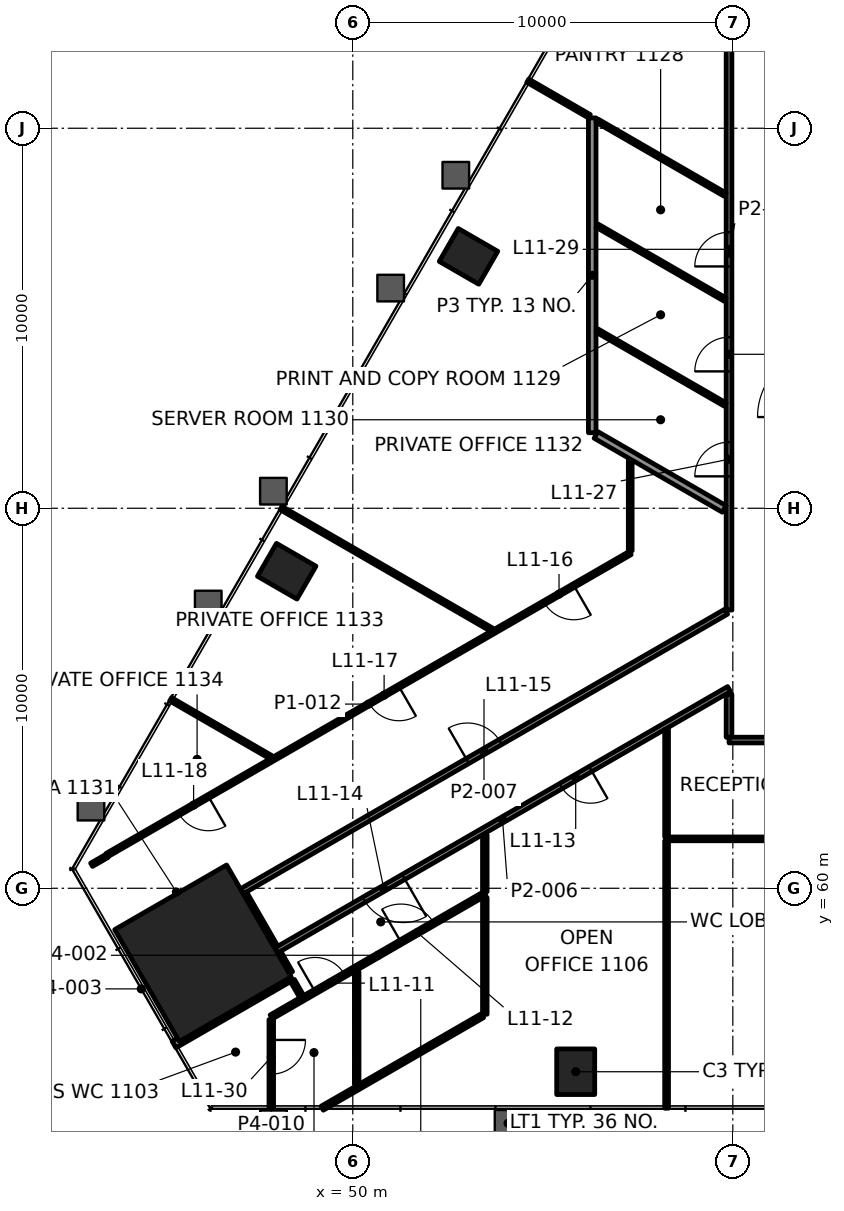
"""IFC4 building model, lengths in metres.
Left out: names, types, materials, properties, quantities, classifications, styles, units other than length and angle.
Written with IfcOpenShell. Run it as: python <this file> out.ifc"""

import sys

from ifc_helpers import new_model, si_unit, direction, frame, frame_2d, origin, origin_2d, place, context, subcontext, project, spatial, rectangle, extrude, element, fill, save


model = new_model("IFC4")
c1 = context("Model", 3, precision=1e-05, world=origin(), true_north=direction((0.0, 1.0)))
c2 = subcontext(c1, "Body", "Model", "MODEL_VIEW")
j1 = project(units=[si_unit("LENGTHUNIT", "METRE"), si_unit("PLANEANGLEUNIT", "RADIAN")], contexts=[c1])
p1 = place(None, origin())
s1 = spatial("IfcSite", under=j1, at=p1, CompositionType="ELEMENT")
p2 = place(p1, origin())
s2 = spatial("IfcBuilding", under=s1, at=p2, CompositionType="ELEMENT")
p3 = place(p2, frame((0.0, 0.0, 52.6)))
s3 = spatial("IfcBuildingStorey", under=s2, at=p3, CompositionType="ELEMENT", Elevation=52.6)
p4 = place(p3, frame((46.057, 58.29, 0.0), z_axis=(0.0, 0.0, 1.0), x_axis=(0.5, -0.866025403784, 0.0)))
e1 = element("IfcColumn", 1, at=p4, inside=s3, PredefinedType="COLUMN", context=c2, shape_type="SweptSolid", body=[
    extrude(rectangle(XDim=3.4, YDim=3.4, at=origin_2d()), origin(), (0.0, 0.0, 1.0), 4.2),
])
for number, where, z_axis, x_axis in (
    (2, (55.865, 55.172, -0.0), (0.0, 0.0, 1.0), (1.0, 0.0, 0.0)),
    (3, (53.045, 76.628, -0.0), (0.0, 0.0, 1.0), (-0.5, -0.866, 0.0)),
    (4, (48.261, 68.343, -0.0), (0.0, 0.0, 1.0), (-0.5, -0.866, 0.0)),
):
    element("IfcColumn", number, at=place(p3, frame(where, z_axis=z_axis, x_axis=x_axis)), inside=s3, PredefinedType="COLUMN", context=c2, shape_type="SweptSolid", body=[
        extrude(rectangle(XDim=1.0, YDim=1.2, at=origin_2d()), origin(), (0.0, 0.0, 1.0), 4.2),
    ])
p5 = place(p3, frame((58.271, 61.3, 0.0), z_axis=(0.0, 0.0, 1.0), x_axis=(1.0, 0.0, 0.0)))
e5 = element("IfcWall", 5, at=p5, inside=s3, PredefinedType="PARTITIONING", context=c2, shape_type="SweptSolid", body=[
    extrude(rectangle(XDim=16.729, YDim=0.1, at=frame_2d((8.365, 0.0))), origin(), (0.0, 0.0, 1.0), 3.4),
])
p6 = place(p5, frame((7.865, 0.0, 0.0)))
e6 = element("IfcOpeningElement", 6, at=p6, cuts=e5, PredefinedType="OPENING", context=c2, shape_type="SweptSolid", body=[
    extrude(rectangle(XDim=1.0, YDim=2.1, at=frame_2d((0.5, 1.05))), frame((0.0, 0.06, 0.0), z_axis=(0.0, -1.0, 0.0), x_axis=(1.0, 0.0, 0.0)), (0.0, 0.0, 1.0), 0.12),
])
p7 = place(p3, frame((90.1, 63.9, 0.0), z_axis=(0.0, 0.0, 1.0), x_axis=(-1.0, 0.0, 0.0)))
e7 = element("IfcWall", 7, at=p7, inside=s3, PredefinedType="PARTITIONING", context=c2, shape_type="SweptSolid", body=[
    extrude(rectangle(XDim=30.2, YDim=0.15, at=frame_2d((15.1, 0.0))), origin(), (0.0, 0.0, 1.0), 3.4),
])
p8 = place(p7, frame((3.578, 0.0, 0.0)))
e8 = element("IfcOpeningElement", 8, at=p8, cuts=e7, PredefinedType="OPENING", context=c2, shape_type="SweptSolid", body=[
    extrude(rectangle(XDim=1.0, YDim=2.1, at=frame_2d((0.5, 1.05))), frame((0.0, 0.085, 0.0), z_axis=(0.0, -1.0, 0.0), x_axis=(1.0, 0.0, 0.0)), (0.0, 0.0, 1.0), 0.17),
])
p9 = place(p7, frame((10.926, 0.0, 0.0)))
e9 = element("IfcOpeningElement", 9, at=p9, cuts=e7, PredefinedType="OPENING", context=c2, shape_type="SweptSolid", body=[
    extrude(rectangle(XDim=1.0, YDim=2.1, at=frame_2d((0.5, 1.05))), frame((0.0, 0.085, 0.0), z_axis=(0.0, -1.0, 0.0), x_axis=(1.0, 0.0, 0.0)), (0.0, 0.0, 1.0), 0.17),
])
p10 = place(p7, frame((22.048, 0.0, 0.0)))
e10 = element("IfcOpeningElement", 10, at=p10, cuts=e7, PredefinedType="OPENING", context=c2, shape_type="SweptSolid", body=[
    extrude(rectangle(XDim=1.0, YDim=2.1, at=frame_2d((0.5, 1.05))), frame((0.0, 0.085, 0.0), z_axis=(0.0, -1.0, 0.0), x_axis=(1.0, 0.0, 0.0)), (0.0, 0.0, 1.0), 0.17),
])
p11 = place(p3, frame((49.194, 54.212, 0.0), z_axis=(0.0, 0.0, 1.0), x_axis=(0.866016997745, 0.500014559404, 0.0)))
e11 = element("IfcWall", 11, at=p11, inside=s3, PredefinedType="PARTITIONING", context=c2, shape_type="SweptSolid", body=[
    extrude(rectangle(XDim=4.871, YDim=0.12, at=frame_2d((2.436, 0.0))), origin(), (0.0, 0.0, 1.0), 3.4),
])
p12 = place(p3, frame((47.855, 56.615, 0.0), z_axis=(0.0, 0.0, 1.0), x_axis=(0.866008853477, 0.500028664877, 0.0)))
e12 = element("IfcWall", 12, at=p12, inside=s3, PredefinedType="PARTITIONING", context=c2, shape_type="SweptSolid", body=[
    extrude(rectangle(XDim=6.487, YDim=0.12, at=frame_2d((3.244, 0.0))), origin(), (0.0, 0.0, 1.0), 3.4),
])
p13 = place(p12, frame((1.329, 0.0, 0.0)))
e13 = element("IfcOpeningElement", 13, at=p13, cuts=e12, PredefinedType="OPENING", context=c2, shape_type="SweptSolid", body=[
    extrude(rectangle(XDim=0.9, YDim=2.1, at=frame_2d((0.45, 1.05))), frame((0.0, 0.07, 0.0), z_axis=(0.0, -1.0, 0.0), x_axis=(1.0, 0.0, 0.0)), (0.0, 0.0, 1.0), 0.14),
])
p14 = place(p12, frame((3.939, 0.0, 0.0)))
e14 = element("IfcOpeningElement", 14, at=p14, cuts=e12, PredefinedType="OPENING", context=c2, shape_type="SweptSolid", body=[
    extrude(rectangle(XDim=1.0, YDim=2.1, at=frame_2d((0.5, 1.05))), frame((0.0, 0.07, 0.0), z_axis=(0.0, -1.0, 0.0), x_axis=(1.0, 0.0, 0.0)), (0.0, 0.0, 1.0), 0.14),
])
p15 = place(p3, frame((45.296, 55.888, 0.0), z_axis=(0.0, 0.0, 1.0), x_axis=(0.866016916595, 0.500014699955, 0.0)))
e15 = element("IfcWall", 15, at=p15, inside=s3, PredefinedType="PARTITIONING", context=c2, shape_type="SweptSolid", body=[
    extrude(rectangle(XDim=3.543, YDim=0.2, at=frame_2d((1.772, 0.0))), origin(), (0.0, 0.0, 1.0), 3.4),
])
p16 = place(p3, frame((59.9, 65.243, 0.0), z_axis=(0.0, 0.0, 1.0), x_axis=(-0.866026378386, -0.499998311937, 0.0)))
e16 = element("IfcWall", 16, at=p16, inside=s3, PredefinedType="PARTITIONING", context=c2, shape_type="SweptSolid", body=[
    extrude(rectangle(XDim=13.764, YDim=0.15, at=frame_2d((6.882, 0.0))), origin(), (0.0, 0.0, 1.0), 3.247),
])
p17 = place(p16, frame((4.209, 0.0, 0.0)))
e17 = element("IfcOpeningElement", 17, at=p17, cuts=e16, PredefinedType="OPENING", context=c2, shape_type="SweptSolid", body=[
    extrude(rectangle(XDim=0.9, YDim=2.1, at=frame_2d((0.45, 1.05))), frame((0.0, 0.085, 0.0), z_axis=(0.0, -1.0, 0.0), x_axis=(1.0, 0.0, 0.0)), (0.0, 0.0, 1.0), 0.17),
])
p18 = place(p16, frame((9.891, 0.0, 0.0)))
e18 = element("IfcOpeningElement", 18, at=p18, cuts=e16, PredefinedType="OPENING", context=c2, shape_type="SweptSolid", body=[
    extrude(rectangle(XDim=1.2, YDim=2.1, at=frame_2d((0.6, 1.05))), frame((0.0, 0.085, 0.0), z_axis=(0.0, -1.0, 0.0), x_axis=(1.0, 0.0, 0.0)), (0.0, 0.0, 1.0), 0.17),
])
p19 = place(p3, frame((47.08, 59.92, 0.0), z_axis=(0.0, 0.0, 1.0), x_axis=(0.866025356753, 0.50000008146, 0.0)))
e19 = element("IfcWall", 19, at=p19, inside=s3, PredefinedType="PARTITIONING", context=c2, shape_type="SweptSolid", body=[
    extrude(rectangle(XDim=14.717, YDim=0.15, at=frame_2d((7.358, 0.0))), origin(), (0.0, 0.0, 1.0), 3.4),
])
p20 = place(p19, frame((6.858, 0.0, 0.0)))
e20 = element("IfcOpeningElement", 20, at=p20, cuts=e19, PredefinedType="OPENING", context=c2, shape_type="SweptSolid", body=[
    extrude(rectangle(XDim=1.0, YDim=2.1, at=frame_2d((0.5, 1.05))), frame((0.0, 0.085, 0.0), z_axis=(0.0, -1.0, 0.0), x_axis=(1.0, 0.0, 0.0)), (0.0, 0.0, 1.0), 0.17),
])
p21 = place(p3, frame((43.127, 60.618, 0.0), z_axis=(0.0, 0.0, 1.0), x_axis=(0.865979310119, 0.500079828073, 0.0)))
e21 = element("IfcWall", 21, at=p21, inside=s3, PredefinedType="PARTITIONING", context=c2, shape_type="SweptSolid", body=[
    extrude(rectangle(XDim=0.473, YDim=0.1, at=frame_2d((0.237, 0.0))), origin(), (0.0, 0.0, 1.0), 3.4),
])
p22 = place(p3, frame((57.3, 68.823, 0.0), z_axis=(0.0, 0.0, 1.0), x_axis=(-0.8660275888, -0.499996215423, 0.0)))
e22 = element("IfcWall", 22, at=p22, inside=s3, PredefinedType="PARTITIONING", context=c2, shape_type="SweptSolid", body=[
    extrude(rectangle(XDim=15.902, YDim=0.1, at=frame_2d((7.951, 0.0))), origin(), (0.0, 0.0, 1.0), 3.4),
])
p23 = place(p22, frame((1.713, 0.0, 0.0)))
e23 = element("IfcOpeningElement", 23, at=p23, cuts=e22, PredefinedType="OPENING", context=c2, shape_type="SweptSolid", body=[
    extrude(rectangle(XDim=0.9, YDim=2.1, at=frame_2d((0.45, 1.05))), frame((0.0, 0.06, 0.0), z_axis=(0.0, -1.0, 0.0), x_axis=(1.0, 0.0, 0.0)), (0.0, 0.0, 1.0), 0.12),
])
p24 = place(p22, frame((7.027, 0.0, 0.0)))
e24 = element("IfcOpeningElement", 24, at=p24, cuts=e22, PredefinedType="OPENING", context=c2, shape_type="SweptSolid", body=[
    extrude(rectangle(XDim=0.9, YDim=2.1, at=frame_2d((0.45, 1.05))), frame((0.0, 0.06, 0.0), z_axis=(0.0, -1.0, 0.0), x_axis=(1.0, 0.0, 0.0)), (0.0, 0.0, 1.0), 0.12),
])
p25 = place(p22, frame((12.816, 0.0, 0.0)))
e25 = element("IfcOpeningElement", 25, at=p25, cuts=e22, PredefinedType="OPENING", context=c2, shape_type="SweptSolid", body=[
    extrude(rectangle(XDim=0.9, YDim=2.1, at=frame_2d((0.45, 1.05))), frame((0.0, 0.06, 0.0), z_axis=(0.0, -1.0, 0.0), x_axis=(1.0, 0.0, 0.0)), (0.0, 0.0, 1.0), 0.12),
])
p26 = place(p3, frame((59.9, 63.975, 0.0), z_axis=(0.0, 0.0, 1.0), x_axis=(0.0, 1.0, 0.0)))
e26 = element("IfcWall", 26, at=p26, inside=s3, PredefinedType="PARTITIONING", context=c2, shape_type="SweptSolid", body=[
    extrude(rectangle(XDim=1.131, YDim=0.15, at=frame_2d((0.565, 0.0))), origin(), (0.0, 0.0, 1.0), 3.247),
])
p27 = place(p3, frame((59.9, 67.321, 0.0), z_axis=(0.0, 0.0, 1.0), x_axis=(0.0, 1.0, 0.0)))
e27 = element("IfcWall", 27, at=p27, inside=s3, PredefinedType="PARTITIONING", context=c2, shape_type="SweptSolid", body=[
    extrude(rectangle(XDim=18.778, YDim=0.15, at=frame_2d((9.389, 0.0))), origin(), (0.0, 0.0, 1.0), 3.4),
])
p28 = place(p27, frame((3.519, 0.0, 0.0)))
e28 = element("IfcOpeningElement", 28, at=p28, cuts=e27, PredefinedType="OPENING", context=c2, shape_type="SweptSolid", body=[
    extrude(rectangle(XDim=0.9, YDim=2.1, at=frame_2d((0.45, 1.05))), frame((0.0, 0.085, 0.0), z_axis=(0.0, -1.0, 0.0), x_axis=(1.0, 0.0, 0.0)), (0.0, 0.0, 1.0), 0.17),
])
p29 = place(p27, frame((6.281, 0.0, 0.0)))
e29 = element("IfcOpeningElement", 29, at=p29, cuts=e27, PredefinedType="OPENING", context=c2, shape_type="SweptSolid", body=[
    extrude(rectangle(XDim=0.9, YDim=2.1, at=frame_2d((0.45, 1.05))), frame((0.0, 0.085, 0.0), z_axis=(0.0, -1.0, 0.0), x_axis=(1.0, 0.0, 0.0)), (0.0, 0.0, 1.0), 0.17),
])
p30 = place(p27, frame((9.042, 0.0, 0.0)))
e30 = element("IfcOpeningElement", 30, at=p30, cuts=e27, PredefinedType="OPENING", context=c2, shape_type="SweptSolid", body=[
    extrude(rectangle(XDim=0.9, YDim=2.1, at=frame_2d((0.45, 1.05))), frame((0.0, 0.085, 0.0), z_axis=(0.0, -1.0, 0.0), x_axis=(1.0, 0.0, 0.0)), (0.0, 0.0, 1.0), 0.17),
])
p31 = place(p3, frame((58.257, 54.212, 0.0), z_axis=(0.0, 0.0, 1.0), x_axis=(0.0, 1.0, 0.0)))
e31 = element("IfcWall", 31, at=p31, inside=s3, PredefinedType="PARTITIONING", context=c2, shape_type="SweptSolid", body=[
    extrude(rectangle(XDim=7.038, YDim=0.1, at=frame_2d((3.519, 0.0))), origin(), (0.0, 0.0, 1.0), 3.165),
])
p32 = place(p3, frame((57.3, 68.88, 0.0), z_axis=(0.0, 0.0, 1.0), x_axis=(0.0, 1.0, 0.0)))
e32 = element("IfcWall", 32, at=p32, inside=s3, PredefinedType="PARTITIONING", context=c2, shape_type="SweptSolid", body=[
    extrude(rectangle(XDim=2.384, YDim=0.1, at=frame_2d((1.192, 0.0))), origin(), (0.0, 0.0, 1.0), 3.4),
])
p33 = place(p3, frame((56.3, 71.988, 0.0), z_axis=(0.0, 0.0, 1.0), x_axis=(0.0, 1.0, 0.0)))
e33 = element("IfcWall", 33, at=p33, inside=s3, PredefinedType="PARTITIONING", context=c2, shape_type="SweptSolid", body=[
    extrude(rectangle(XDim=8.284, YDim=0.2, at=frame_2d((4.142, 0.0))), origin(), (0.0, 0.0, 1.0), 3.4),
])
p34 = place(p3, frame((53.474, 56.683, 0.0), z_axis=(0.0, 0.0, 1.0), x_axis=(0.0, 1.0, 0.0)))
e34 = element("IfcWall", 34, at=p34, inside=s3, PredefinedType="PARTITIONING", context=c2, shape_type="SweptSolid", body=[
    extrude(rectangle(XDim=3.072, YDim=0.12, at=frame_2d((1.536, 0.0))), origin(), (0.0, 0.0, 1.0), 3.4),
])
p35 = place(p3, frame((50.103, 54.846, 0.0), z_axis=(0.0, 0.0, 1.0), x_axis=(0.0, 1.0, 0.0)))
e35 = element("IfcWall", 35, at=p35, inside=s3, PredefinedType="PARTITIONING", context=c2, shape_type="SweptSolid", body=[
    extrude(rectangle(XDim=2.957, YDim=0.12, at=frame_2d((1.479, 0.0))), origin(), (0.0, 0.0, 1.0), 3.4),
])
p36 = place(p3, frame((47.855, 56.545, 0.0), z_axis=(0.0, 0.0, 1.0), x_axis=(0.0, -1.0, 0.0)))
e36 = element("IfcWall", 36, at=p36, inside=s3, PredefinedType="PARTITIONING", context=c2, shape_type="SweptSolid", body=[
    extrude(rectangle(XDim=2.333, YDim=0.12, at=frame_2d((1.167, 0.0))), origin(), (0.0, 0.0, 1.0), 3.4),
])
p37 = place(p36, frame((0.537, 0.0, 0.0)))
e37 = element("IfcOpeningElement", 37, at=p37, cuts=e36, PredefinedType="OPENING", context=c2, shape_type="SweptSolid", body=[
    extrude(rectangle(XDim=0.9, YDim=2.1, at=frame_2d((0.45, 1.05))), frame((0.0, 0.07, 0.0), z_axis=(0.0, -1.0, 0.0), x_axis=(1.0, 0.0, 0.0)), (0.0, 0.0, 1.0), 0.14),
])
p38 = place(p3, frame((48.33, 57.755, 0.0), z_axis=(0.0, 0.0, 1.0), x_axis=(-0.500342721131, 0.865827443207, 0.0)))
e38 = element("IfcWall", 38, at=p38, inside=s3, PredefinedType="PARTITIONING", context=c2, shape_type="SweptSolid", body=[
    extrude(rectangle(XDim=0.625, YDim=0.2, at=frame_2d((0.312, 0.0))), origin(), (0.0, 0.0, 1.0), 3.4),
])
p39 = place(p3, frame((48.652, 57.156, 0.0), z_axis=(0.0, 0.0, 1.0), x_axis=(-0.499913221443, 0.866075499611, 0.0)))
e39 = element("IfcWall", 39, at=p39, inside=s3, PredefinedType="PARTITIONING", context=c2, shape_type="SweptSolid", body=[
    extrude(rectangle(XDim=0.48, YDim=0.12, at=frame_2d((0.24, 0.0))), origin(), (0.0, 0.0, 1.0), 3.4),
])
p40 = place(p3, frame((59.799, 78.252, 0.0), z_axis=(0.0, 0.0, 1.0), x_axis=(-0.866036349784, 0.499981040493, 0.0)))
e40 = element("IfcWall", 40, at=p40, inside=s3, PredefinedType="PARTITIONING", context=c2, shape_type="SweptSolid", body=[
    extrude(rectangle(XDim=3.896, YDim=0.1, at=frame_2d((1.948, 0.0))), origin(), (0.0, 0.0, 1.0), 3.4),
])
p41 = place(p3, frame((59.799, 75.49, 0.0), z_axis=(0.0, 0.0, 1.0), x_axis=(-0.866043624834, 0.499968438888, 0.0)))
e41 = element("IfcWall", 41, at=p41, inside=s3, PredefinedType="PARTITIONING", context=c2, shape_type="SweptSolid", body=[
    extrude(rectangle(XDim=3.895, YDim=0.1, at=frame_2d((1.947, 0.0))), origin(), (0.0, 0.0, 1.0), 3.4),
])
p42 = place(p3, frame((59.799, 72.729, 0.0), z_axis=(0.0, 0.0, 1.0), x_axis=(-0.866016482536, 0.500015451737, 0.0)))
e42 = element("IfcWall", 42, at=p42, inside=s3, PredefinedType="PARTITIONING", context=c2, shape_type="SweptSolid", body=[
    extrude(rectangle(XDim=3.895, YDim=0.1, at=frame_2d((1.948, 0.0))), origin(), (0.0, 0.0, 1.0), 3.4),
])
p43 = place(p3, frame((59.773, 69.982, 0.0), z_axis=(0.0, 0.0, 1.0), x_axis=(-0.866043624834, 0.499968438888, 0.0)))
e43 = element("IfcWall", 43, at=p43, inside=s3, PredefinedType="PARTITIONING", context=c2, shape_type="SweptSolid", body=[
    extrude(rectangle(XDim=3.895, YDim=0.2, at=frame_2d((1.947, 0.0))), origin(), (0.0, 0.0, 1.0), 3.4),
])
p44 = place(p3, frame((53.654, 66.805, 0.0), z_axis=(0.0, 0.0, 1.0), x_axis=(-0.866029926444, 0.499992166441, 0.0)))
e44 = element("IfcWall", 44, at=p44, inside=s3, PredefinedType="PARTITIONING", context=c2, shape_type="SweptSolid", body=[
    extrude(rectangle(XDim=6.399, YDim=0.1, at=frame_2d((3.199, 0.0))), origin(), (0.0, 0.0, 1.0), 3.165),
])
p45 = place(p3, frame((47.843, 63.45, 0.0), z_axis=(0.0, 0.0, 1.0), x_axis=(-0.86603332906, 0.499986272769, 0.0)))
e45 = element("IfcWall", 45, at=p45, inside=s3, PredefinedType="PARTITIONING", context=c2, shape_type="SweptSolid", body=[
    extrude(rectangle(XDim=3.044, YDim=0.1, at=frame_2d((1.522, 0.0))), origin(), (0.0, 0.0, 1.0), 3.4),
])
p46 = place(p3, frame((53.474, 59.91, 0.0), z_axis=(0.0, 0.0, 1.0), x_axis=(0.0, 1.0, 0.0)))
e46 = element("IfcWall", 46, at=p46, inside=s3, PredefinedType="PARTITIONING", context=c2, shape_type="SweptSolid", body=[
    extrude(rectangle(XDim=1.496, YDim=0.12, at=frame_2d((0.748, 0.0))), origin(), (0.0, 0.0, 1.0), 3.4),
])
p47 = place(p3, frame((47.942, 58.426, 0.0), z_axis=(0.0, 0.0, 1.0), x_axis=(-0.499991515992, 0.866030301974, 0.0)))
e47 = element("IfcWall", 47, at=p47, inside=s3, PredefinedType="PARTITIONING", context=c2, shape_type="SweptSolid", body=[
    extrude(rectangle(XDim=1.649, YDim=0.2, at=frame_2d((0.825, 0.0))), origin(), (0.0, 0.0, 1.0), 3.247),
])
p48 = place(p3, frame((56.225, 80.316, 0.0), z_axis=(0.0, 0.0, 1.0), x_axis=(-0.86600952399, 0.500027503603, 0.0)))
e48 = element("IfcWall", 48, at=p48, inside=s3, PredefinedType="PARTITIONING", context=c2, shape_type="SweptSolid", body=[
    extrude(rectangle(XDim=1.871, YDim=0.1, at=frame_2d((0.935, 0.0))), origin(), (0.0, 0.0, 1.0), 3.165),
])
p49 = place(p3, frame((58.257, 61.35, 0.0), z_axis=(0.0, 0.0, 1.0), x_axis=(0.0, 1.0, 0.0)))
e49 = element("IfcWall", 49, at=p49, inside=s3, PredefinedType="PARTITIONING", context=c2, shape_type="SweptSolid", body=[
    extrude(rectangle(XDim=2.828, YDim=0.1, at=frame_2d((1.414, 0.0))), origin(), (0.0, 0.0, 1.0), 3.247),
])
p50 = place(p13, origin())
e50 = element("IfcDoor", 50, at=p50, inside=s3, OperationType="SINGLE_SWING_LEFT", PredefinedType="DOOR", context=c2, shape_type="SweptSolid", body=[
    extrude(rectangle(XDim=0.9, YDim=2.1, at=frame_2d((0.45, 1.05))), frame((0.0, 0.025, 0.0), z_axis=(0.0, -1.0, 0.0), x_axis=(1.0, 0.0, 0.0)), (0.0, 0.0, 1.0), 0.05),
])
fill(e13, e50)
p51 = place(p14, origin())
e51 = element("IfcDoor", 51, at=p51, inside=s3, OperationType="SINGLE_SWING_RIGHT", PredefinedType="DOOR", context=c2, shape_type="SweptSolid", body=[
    extrude(rectangle(XDim=1.0, YDim=2.1, at=frame_2d((0.5, 1.05))), frame((0.0, 0.025, 0.0), z_axis=(0.0, -1.0, 0.0), x_axis=(1.0, 0.0, 0.0)), (0.0, 0.0, 1.0), 0.05),
])
fill(e14, e51)
p52 = place(p17, origin())
e52 = element("IfcDoor", 52, at=p52, inside=s3, OperationType="SINGLE_SWING_RIGHT", PredefinedType="DOOR", context=c2, shape_type="SweptSolid", body=[
    extrude(rectangle(XDim=0.9, YDim=2.1, at=frame_2d((0.45, 1.05))), frame((0.0, 0.025, 0.0), z_axis=(0.0, -1.0, 0.0), x_axis=(1.0, 0.0, 0.0)), (0.0, 0.0, 1.0), 0.05),
])
fill(e17, e52)
p53 = place(p18, origin())
e53 = element("IfcDoor", 53, at=p53, inside=s3, OperationType="DOUBLE_DOOR_SINGLE_SWING", PredefinedType="DOOR", context=c2, shape_type="SweptSolid", body=[
    extrude(rectangle(XDim=1.2, YDim=2.1, at=frame_2d((0.6, 1.05))), frame((0.0, 0.025, 0.0), z_axis=(0.0, -1.0, 0.0), x_axis=(1.0, 0.0, 0.0)), (0.0, 0.0, 1.0), 0.05),
])
fill(e18, e53)
p54 = place(p20, origin())
e54 = element("IfcDoor", 54, at=p54, inside=s3, OperationType="SINGLE_SWING_RIGHT", PredefinedType="DOOR", context=c2, shape_type="SweptSolid", body=[
    extrude(rectangle(XDim=1.0, YDim=2.1, at=frame_2d((0.5, 1.05))), frame((0.0, 0.025, 0.0), z_axis=(0.0, -1.0, 0.0), x_axis=(1.0, 0.0, 0.0)), (0.0, 0.0, 1.0), 0.05),
])
fill(e20, e54)
p55 = place(p23, origin())
e55 = element("IfcDoor", 55, at=p55, inside=s3, OperationType="SINGLE_SWING_RIGHT", PredefinedType="DOOR", context=c2, shape_type="SweptSolid", body=[
    extrude(rectangle(XDim=0.9, YDim=2.1, at=frame_2d((0.45, 1.05))), frame((0.0, 0.025, 0.0), z_axis=(0.0, -1.0, 0.0), x_axis=(1.0, 0.0, 0.0)), (0.0, 0.0, 1.0), 0.05),
])
fill(e23, e55)
p56 = place(p24, origin())
e56 = element("IfcDoor", 56, at=p56, inside=s3, OperationType="SINGLE_SWING_LEFT", PredefinedType="DOOR", context=c2, shape_type="SweptSolid", body=[
    extrude(rectangle(XDim=0.9, YDim=2.1, at=frame_2d((0.45, 1.05))), frame((0.0, 0.025, 0.0), z_axis=(0.0, -1.0, 0.0), x_axis=(1.0, 0.0, 0.0)), (0.0, 0.0, 1.0), 0.05),
])
fill(e24, e56)
p57 = place(p25, origin())
e57 = element("IfcDoor", 57, at=p57, inside=s3, OperationType="SINGLE_SWING_RIGHT", PredefinedType="DOOR", context=c2, shape_type="SweptSolid", body=[
    extrude(rectangle(XDim=0.9, YDim=2.1, at=frame_2d((0.45, 1.05))), frame((0.0, 0.025, 0.0), z_axis=(0.0, -1.0, 0.0), x_axis=(1.0, 0.0, 0.0)), (0.0, 0.0, 1.0), 0.05),
])
fill(e25, e57)
p58 = place(p28, origin())
e58 = element("IfcDoor", 58, at=p58, inside=s3, OperationType="SINGLE_SWING_LEFT", PredefinedType="DOOR", context=c2, shape_type="SweptSolid", body=[
    extrude(rectangle(XDim=0.9, YDim=2.1, at=frame_2d((0.45, 1.05))), frame((0.0, 0.025, 0.0), z_axis=(0.0, -1.0, 0.0), x_axis=(1.0, 0.0, 0.0)), (0.0, 0.0, 1.0), 0.05),
])
fill(e28, e58)
p59 = place(p29, origin())
e59 = element("IfcDoor", 59, at=p59, inside=s3, OperationType="SINGLE_SWING_RIGHT", PredefinedType="DOOR", context=c2, shape_type="SweptSolid", body=[
    extrude(rectangle(XDim=0.9, YDim=2.1, at=frame_2d((0.45, 1.05))), frame((0.0, 0.025, 0.0), z_axis=(0.0, -1.0, 0.0), x_axis=(1.0, 0.0, 0.0)), (0.0, 0.0, 1.0), 0.05),
])
fill(e29, e59)
p60 = place(p30, origin())
e60 = element("IfcDoor", 60, at=p60, inside=s3, OperationType="SINGLE_SWING_LEFT", PredefinedType="DOOR", context=c2, shape_type="SweptSolid", body=[
    extrude(rectangle(XDim=0.9, YDim=2.1, at=frame_2d((0.45, 1.05))), frame((0.0, 0.025, 0.0), z_axis=(0.0, -1.0, 0.0), x_axis=(1.0, 0.0, 0.0)), (0.0, 0.0, 1.0), 0.05),
])
fill(e30, e60)
p61 = place(p37, origin())
e61 = element("IfcDoor", 61, at=p61, inside=s3, OperationType="SINGLE_SWING_LEFT", PredefinedType="DOOR", context=c2, shape_type="SweptSolid", body=[
    extrude(rectangle(XDim=0.9, YDim=2.1, at=frame_2d((0.45, 1.05))), frame((0.0, 0.025, 0.0), z_axis=(0.0, -1.0, 0.0), x_axis=(1.0, 0.0, 0.0)), (0.0, 0.0, 1.0), 0.05),
])
fill(e37, e61)
save(model, sys.argv[1])
